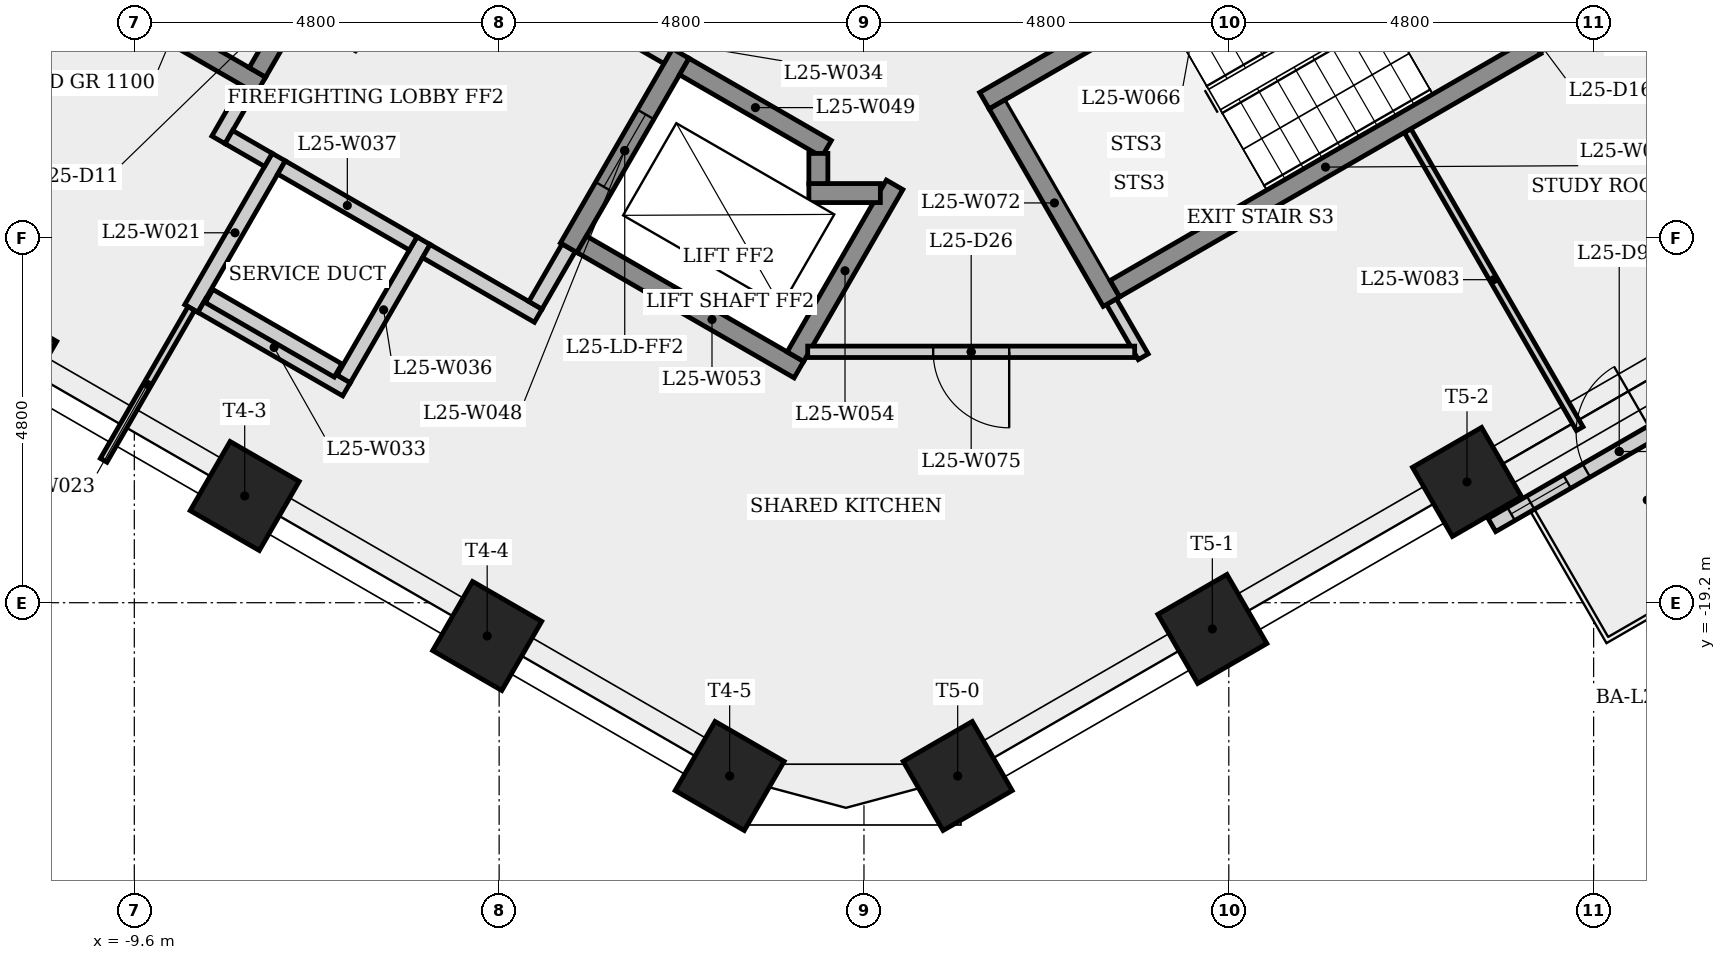
"""IFC4 building model, lengths in metres.
Left out: names, types, materials, properties, quantities, classifications, styles, units other than length and angle.
Written with IfcOpenShell. Run it as: python <this file> out.ifc"""

import sys

from ifc_helpers import new_model, si_unit, direction, frame, frame_2d, origin, origin_2d, place, context, subcontext, project, spatial, rectangle, extrude, element, fill, save


model = new_model("IFC4")
c1 = context("Model", 3, precision=1e-05, world=origin(), true_north=direction((0.0, 1.0)))
c2 = subcontext(c1, "Body", "Model", "MODEL_VIEW")
j1 = project(units=[si_unit("LENGTHUNIT", "METRE"), si_unit("PLANEANGLEUNIT", "RADIAN")], contexts=[c1])
p1 = place(None, origin())
s1 = spatial("IfcSite", under=j1, at=p1, CompositionType="ELEMENT")
p2 = place(p1, origin())
s2 = spatial("IfcBuilding", under=s1, at=p2, CompositionType="ELEMENT")
p3 = place(p2, frame((0.0, 0.0, 96.7)))
s3 = spatial("IfcBuildingStorey", under=s2, at=p3, CompositionType="ELEMENT", Elevation=96.7)
for number, where, z_axis, x_axis in (
    (1, (-11.338, -15.954, 0.0), (0.0, 0.0, 1.0), (-0.5, -0.866, 0.0)),
    (2, (-8.148, -17.796, 0.0), (0.0, 0.0, 1.0), (-0.5, -0.866, 0.0)),
    (3, (-4.957, -19.638, 0.0), (0.0, 0.0, 1.0), (-0.5, -0.866, 0.0)),
    (4, (-1.767, -21.48, 0.0), (0.0, 0.0, 1.0), (-0.5, -0.866, 0.0)),
    (5, (1.233, -21.48, 0.0), (0.0, 0.0, 1.0), (0.5, -0.866, 0.0)),
    (6, (4.583, -19.545, 0.0), (0.0, 0.0, 1.0), (0.5, -0.866, 0.0)),
    (7, (7.934, -17.611, 0.0), (0.0, 0.0, 1.0), (0.5, -0.866, 0.0)),
):
    element("IfcColumn", number, at=place(p3, frame(where, z_axis=z_axis, x_axis=x_axis)), inside=s3, PredefinedType="COLUMN", context=c2, shape_type="SweptSolid", body=[
        extrude(rectangle(XDim=1.05, YDim=1.05, at=origin_2d()), origin(), (0.0, 0.0, 1.0), 3.4),
    ])
p4 = place(p3, frame((8.261, -18.178, 0.0), z_axis=(0.0, 0.0, 1.0), x_axis=(0.866040571269, 0.499973728225, 0.0)))
e8 = element("IfcWall", 8, at=p4, inside=s3, PredefinedType="SOLIDWALL", context=c2, shape_type="SweptSolid", body=[
    extrude(rectangle(XDim=3.869, YDim=0.2, at=frame_2d((1.935, 0.0))), origin(), (0.0, 0.0, 1.0), 3.4),
])
p5 = place(p4, frame((1.435, 0.0, 0.0)))
e9 = element("IfcOpeningElement", 9, at=p5, cuts=e8, PredefinedType="OPENING", context=c2, shape_type="SweptSolid", body=[
    extrude(rectangle(XDim=1.0, YDim=2.4, at=frame_2d((0.5, 1.2))), frame((0.0, 0.11, 0.0), z_axis=(0.0, -1.0, 0.0), x_axis=(1.0, 0.0, 0.0)), (0.0, 0.0, 1.0), 0.22),
])
p6 = place(p4, frame((0.292, 0.0, 0.9)))
e10 = element("IfcOpeningElement", 10, at=p6, cuts=e8, PredefinedType="OPENING", context=c2, shape_type="SweptSolid", body=[
    extrude(rectangle(XDim=0.85, YDim=1.5, at=frame_2d((0.425, 0.75))), frame((0.0, 0.11, 0.0), z_axis=(0.0, -1.0, 0.0), x_axis=(1.0, 0.0, 0.0)), (0.0, 0.0, 1.0), 0.22),
])
p7 = place(p4, frame((2.727, 0.0, 0.9)))
e11 = element("IfcOpeningElement", 11, at=p7, cuts=e8, PredefinedType="OPENING", context=c2, shape_type="SweptSolid", body=[
    extrude(rectangle(XDim=0.85, YDim=1.5, at=frame_2d((0.425, 0.75))), frame((0.0, 0.11, 0.0), z_axis=(0.0, -1.0, 0.0), x_axis=(1.0, 0.0, 0.0)), (0.0, 0.0, 1.0), 0.22),
])
p8 = place(p3, frame((-8.85, -15.329, 0.0), z_axis=(0.0, 0.0, 1.0), x_axis=(0.500077740698, 0.865980515519, 0.0)))
e12 = element("IfcWall", 12, at=p8, inside=s3, PredefinedType="PLUMBINGWALL", context=c2, shape_type="SweptSolid", body=[
    extrude(rectangle(XDim=2.3, YDim=0.2, at=frame_2d((1.15, 0.0))), origin(), (0.0, 0.0, 1.0), 3.05),
])
p9 = place(p3, frame((-8.85, -15.329, 0.0), z_axis=(0.0, 0.0, 1.0), x_axis=(-0.500009533716, -0.866019899421, 0.0)))
e13 = element("IfcWall", 13, at=p9, inside=s3, PredefinedType="PARTITIONING", context=c2, shape_type="SweptSolid", body=[
    extrude(rectangle(XDim=2.307, YDim=0.1, at=frame_2d((1.153, 0.0))), origin(), (0.0, 0.0, 1.0), 3.05),
])
p10 = place(p3, frame((-8.493, -13.11, 0.0), z_axis=(0.0, 0.0, 1.0), x_axis=(0.500067724834, 0.865986299303, 0.0)))
e14 = element("IfcWall", 14, at=p10, inside=s3, PredefinedType="PARTITIONING", context=c2, shape_type="SweptSolid", body=[
    extrude(rectangle(XDim=0.775, YDim=0.2, at=frame_2d((0.388, 0.0))), origin(), (0.0, 0.0, 1.0), 3.05),
])
p11 = place(p3, frame((-7.935, -12.393, 0.0), z_axis=(0.0, 0.0, 1.0), x_axis=(-0.866025499775, 0.499999833739, 0.0)))
e15 = element("IfcWall", 15, at=p11, inside=s3, PredefinedType="SHEAR", context=c2, shape_type="SweptSolid", body=[
    extrude(rectangle(XDim=6.4, YDim=0.25, at=frame_2d((3.2, 0.0))), origin(), (0.0, 0.0, 1.0), 3.05),
])
p12 = place(p3, frame((-7.836, -13.373, 0.0), z_axis=(0.0, 0.0, 1.0), x_axis=(-0.866232998003, 0.499640263761, 0.0)))
e16 = element("IfcWall", 16, at=p12, inside=s3, PredefinedType="PARTITIONING", context=c2, shape_type="SweptSolid", body=[
    extrude(rectangle(XDim=0.6, YDim=0.2, at=frame_2d((0.3, 0.0))), origin(), (0.0, 0.0, 1.0), 3.05),
])
p13 = place(p3, frame((-6.808, -16.392, 0.0), z_axis=(0.0, 0.0, 1.0), x_axis=(-0.866008176907, 0.50002983664, 0.0)))
e17 = element("IfcWall", 17, at=p13, inside=s3, PredefinedType="PLUMBINGWALL", context=c2, shape_type="SweptSolid", body=[
    extrude(rectangle(XDim=2.2, YDim=0.2, at=frame_2d((1.1, 0.0))), origin(), (0.0, 0.0, 1.0), 3.05),
])
p14 = place(p3, frame((-6.605, -9.841, 0.0), z_axis=(0.0, 0.0, 1.0), x_axis=(-0.499996545922, -0.866027397988, 0.0)))
e18 = element("IfcWall", 18, at=p14, inside=s3, PredefinedType="SHEAR", context=c2, shape_type="SweptSolid", body=[
    extrude(rectangle(XDim=2.75, YDim=0.25, at=frame_2d((1.375, 0.0))), origin(), (0.0, 0.0, 1.0), 3.05),
])
p15 = place(p14, frame((0.875, 0.0, 0.0)))
e19 = element("IfcOpeningElement", 19, at=p15, cuts=e18, PredefinedType="OPENING", context=c2, shape_type="SweptSolid", body=[
    extrude(rectangle(XDim=1.0, YDim=2.1, at=frame_2d((0.5, 1.05))), frame((0.0, 0.135, 0.0), z_axis=(0.0, -1.0, 0.0), x_axis=(1.0, 0.0, 0.0)), (0.0, 0.0, 1.0), 0.27),
])
p16 = place(p3, frame((-6.435, -9.795, 0.0), z_axis=(0.0, 0.0, 1.0), x_axis=(0.866012907634, -0.500021643343, 0.0)))
e20 = element("IfcWall", 20, at=p16, inside=s3, PredefinedType="PARTITIONING", context=c2, shape_type="SweptSolid", body=[
    extrude(rectangle(XDim=4.45, YDim=0.2, at=frame_2d((2.225, 0.0))), origin(), (0.0, 0.0, 1.0), 3.05),
])
p17 = place(p16, frame((1.675, 0.0, 0.0)))
e21 = element("IfcOpeningElement", 21, at=p17, cuts=e20, PredefinedType="OPENING", context=c2, shape_type="SweptSolid", body=[
    extrude(rectangle(XDim=1.1, YDim=2.1, at=frame_2d((0.55, 1.05))), frame((0.0, 0.11, 0.0), z_axis=(0.0, -1.0, 0.0), x_axis=(1.0, 0.0, 0.0)), (0.0, 0.0, 1.0), 0.22),
])
p18 = place(p3, frame((-5.795, -14.437, 0.0), z_axis=(0.0, 0.0, 1.0), x_axis=(-0.500027713859, -0.866009402589, 0.0)))
e22 = element("IfcWall", 22, at=p18, inside=s3, PredefinedType="PLUMBINGWALL", context=c2, shape_type="SweptSolid", body=[
    extrude(rectangle(XDim=2.1, YDim=0.2, at=frame_2d((1.05, 0.0))), origin(), (0.0, 0.0, 1.0), 3.05),
])
p19 = place(p3, frame((-5.931, -14.473, 0.0), z_axis=(0.0, 0.0, 1.0), x_axis=(-0.866041268327, 0.499972520799, 0.0)))
e23 = element("IfcWall", 23, at=p19, inside=s3, PredefinedType="PLUMBINGWALL", context=c2, shape_type="SweptSolid", body=[
    extrude(rectangle(XDim=2.0, YDim=0.2, at=frame_2d((1.0, 0.0))), origin(), (0.0, 0.0, 1.0), 3.05),
])
p20 = place(p3, frame((-4.286, -15.423, 0.0), z_axis=(0.0, 0.0, 1.0), x_axis=(-0.866025371046, 0.500000056704, 0.0)))
e24 = element("IfcWall", 24, at=p20, inside=s3, PredefinedType="PARTITIONING", context=c2, shape_type="SweptSolid", body=[
    extrude(rectangle(XDim=1.7, YDim=0.2, at=frame_2d((0.85, 0.0))), origin(), (0.0, 0.0, 1.0), 3.05),
])
p21 = place(p3, frame((-3.885, -14.529, 0.0), z_axis=(0.0, 0.0, 1.0), x_axis=(-0.499859285417, -0.866106630146, 0.0)))
e25 = element("IfcWall", 25, at=p21, inside=s3, PredefinedType="PARTITIONING", context=c2, shape_type="SweptSolid", body=[
    extrude(rectangle(XDim=0.875, YDim=0.2, at=frame_2d((0.438, 0.0))), origin(), (0.0, 0.0, 1.0), 3.05),
])
p22 = place(p3, frame((-2.41, -11.974, 0.0), z_axis=(0.0, 0.0, 1.0), x_axis=(-0.500001826776, -0.866024349092, 0.0)))
e26 = element("IfcWall", 26, at=p22, inside=s3, PredefinedType="SHEAR", context=c2, shape_type="SweptSolid", body=[
    extrude(rectangle(XDim=2.95, YDim=0.25, at=frame_2d((1.475, 0.0))), origin(), (0.0, 0.0, 1.0), 3.05),
])
p23 = place(p22, frame((0.925, 0.0, 0.0)))
e27 = element("IfcOpeningElement", 27, at=p23, cuts=e26, PredefinedType="OPENING", context=c2, shape_type="SweptSolid", body=[
    extrude(rectangle(XDim=1.1, YDim=2.1, at=frame_2d((0.55, 1.05))), frame((0.0, 0.135, 0.0), z_axis=(0.0, -1.0, 0.0), x_axis=(1.0, 0.0, 0.0)), (0.0, 0.0, 1.0), 0.27),
])
p24 = place(p3, frame((-2.364, -12.145, 0.0), z_axis=(0.0, 0.0, 1.0), x_axis=(0.86603892542, -0.499976579108, 0.0)))
e28 = element("IfcWall", 28, at=p24, inside=s3, PredefinedType="SHEAR", context=c2, shape_type="SweptSolid", body=[
    extrude(rectangle(XDim=2.162, YDim=0.25, at=frame_2d((1.081, 0.0))), origin(), (0.0, 0.0, 1.0), 3.05),
])
p25 = place(p3, frame((-0.856, -16.133, 0.0), z_axis=(0.0, 0.0, 1.0), x_axis=(-0.866021716278, 0.500006386895, 0.0)))
e29 = element("IfcWall", 29, at=p25, inside=s3, PredefinedType="SHEAR", context=c2, shape_type="SweptSolid", body=[
    extrude(rectangle(XDim=3.3, YDim=0.25, at=frame_2d((1.65, 0.0))), origin(), (0.0, 0.0, 1.0), 3.05),
])
p26 = place(p3, frame((-0.902, -15.962, 0.0), z_axis=(0.0, 0.0, 1.0), x_axis=(0.499981517636, 0.866036074319, 0.0)))
e30 = element("IfcWall", 30, at=p26, inside=s3, PredefinedType="SHEAR", context=c2, shape_type="SweptSolid", body=[
    extrude(rectangle(XDim=2.61, YDim=0.25, at=frame_2d((1.305, 0.0))), origin(), (0.0, 0.0, 1.0), 3.05),
])
p27 = place(p3, frame((-0.725, -13.81, 0.0), z_axis=(0.0, 0.0, 1.0), x_axis=(1.0, 0.0, 0.0)))
e31 = element("IfcWall", 31, at=p27, inside=s3, PredefinedType="SHEAR", context=c2, shape_type="SweptSolid", body=[
    extrude(rectangle(XDim=0.941, YDim=0.25, at=frame_2d((0.47, 0.0))), origin(), (0.0, 0.0, 1.0), 3.4),
])
p28 = place(p3, frame((-0.6, -13.289, 0.0), z_axis=(0.0, 0.0, 1.0), x_axis=(0.0, -1.0, 0.0)))
e32 = element("IfcWall", 32, at=p28, inside=s3, PredefinedType="SHEAR", context=c2, shape_type="SweptSolid", body=[
    extrude(rectangle(XDim=0.396, YDim=0.25, at=frame_2d((0.198, 0.0))), origin(), (0.0, 0.0, 1.0), 3.4),
])
p29 = place(p3, frame((1.585, -12.595, 0.0), z_axis=(0.0, 0.0, 1.0), x_axis=(0.866036417653, 0.499980922934, 0.0)))
e33 = element("IfcWall", 33, at=p29, inside=s3, PredefinedType="SHEAR", context=c2, shape_type="SweptSolid", body=[
    extrude(rectangle(XDim=6.65, YDim=0.25, at=frame_2d((3.325, 0.0))), origin(), (0.0, 0.0, 1.0), 3.05),
])
p30 = place(p29, frame((5.275, 0.0, 0.0)))
e34 = element("IfcOpeningElement", 34, at=p30, cuts=e33, PredefinedType="OPENING", context=c2, shape_type="SweptSolid", body=[
    extrude(rectangle(XDim=1.0, YDim=2.1, at=frame_2d((0.5, 1.05))), frame((0.0, 0.135, 0.0), z_axis=(0.0, -1.0, 0.0), x_axis=(1.0, 0.0, 0.0)), (0.0, 0.0, 1.0), 0.27),
])
p31 = place(p3, frame((3.256, -15.239, 0.0), z_axis=(0.0, 0.0, 1.0), x_axis=(0.499840262897, -0.866117608404, 0.0)))
e35 = element("IfcWall", 35, at=p31, inside=s3, PredefinedType="PARTITIONING", context=c2, shape_type="SweptSolid", body=[
    extrude(rectangle(XDim=0.837, YDim=0.15, at=frame_2d((0.418, 0.0))), origin(), (0.0, 0.0, 1.0), 3.05),
])
p32 = place(p3, frame((3.256, -15.239, 0.0), z_axis=(0.0, 0.0, 1.0), x_axis=(-0.50002537861, 0.866010750942, 0.0)))
e36 = element("IfcWall", 36, at=p32, inside=s3, PredefinedType="SHEAR", context=c2, shape_type="SweptSolid", body=[
    extrude(rectangle(XDim=3.0, YDim=0.25, at=frame_2d((1.5, 0.0))), origin(), (0.0, 0.0, 1.0), 3.05),
])
p33 = place(p3, frame((3.562, -15.899, 0.0), z_axis=(0.0, 0.0, 1.0), x_axis=(-1.0, 0.0, 0.0)))
e37 = element("IfcWall", 37, at=p33, inside=s3, PredefinedType="PARTITIONING", context=c2, shape_type="SweptSolid", body=[
    extrude(rectangle(XDim=4.302, YDim=0.15, at=frame_2d((2.151, 0.0))), origin(), (0.0, 0.0, 1.0), 3.05),
])
p34 = place(p33, frame((1.651, 0.0, 0.0)))
e38 = element("IfcOpeningElement", 38, at=p34, cuts=e37, PredefinedType="OPENING", context=c2, shape_type="SweptSolid", body=[
    extrude(rectangle(XDim=1.0, YDim=2.1, at=frame_2d((0.5, 1.05))), frame((0.0, 0.085, 0.0), z_axis=(0.0, -1.0, 0.0), x_axis=(1.0, 0.0, 0.0)), (0.0, 0.0, 1.0), 0.17),
])
p35 = place(p3, frame((7.153, -12.989, 0.0), z_axis=(0.0, 0.0, 1.0), x_axis=(0.500000914898, -0.866024875567, 0.0)))
e39 = element("IfcWall", 39, at=p35, inside=s3, PredefinedType="PARTITIONING", context=c2, shape_type="SweptSolid", body=[
    extrude(rectangle(XDim=4.528, YDim=0.1, at=frame_2d((2.264, 0.0))), origin(), (0.0, 0.0, 1.0), 3.05),
])
p36 = place(p3, frame((3.301, -15.068, 0.0), z_axis=(0.0, 0.0, 1.0), x_axis=(0.866035036182, 0.499983315828, 0.0)))
e40 = element("IfcWall", 40, at=p36, inside=s3, PredefinedType="SHEAR", context=c2, shape_type="SweptSolid", body=[
    extrude(rectangle(XDim=6.4, YDim=0.25, at=frame_2d((3.2, 0.0))), origin(), (0.0, 0.0, 1.0), 3.05),
])
p37 = place(p3, frame((10.901, -10.681, 0.0), z_axis=(0.0, 0.0, 1.0), x_axis=(-0.866007538022, -0.500030943131, 0.0)))
e41 = element("IfcWall", 41, at=p37, inside=s3, PredefinedType="PARTITIONING", context=c2, shape_type="SweptSolid", body=[
    extrude(rectangle(XDim=2.375, YDim=0.2, at=frame_2d((1.188, 0.0))), origin(), (0.0, 0.0, 1.0), 3.05),
])
p38 = place(p3, frame((-6.919, -16.144, 0.0), z_axis=(0.0, 0.0, 1.0), x_axis=(-0.866042469362, 0.499970440388, 0.0)))
e42 = element("IfcWall", 42, at=p38, inside=s3, PredefinedType="PLUMBINGWALL", context=c2, shape_type="SweptSolid", body=[
    extrude(rectangle(XDim=1.96, YDim=0.2, at=frame_2d((0.98, 0.0))), origin(), (0.0, 0.0, 1.0), 3.05),
])
p39 = place(p5, origin())
e43 = element("IfcDoor", 43, at=p39, inside=s3, OperationType="SINGLE_SWING_RIGHT", PredefinedType="DOOR", context=c2, shape_type="SweptSolid", body=[
    extrude(rectangle(XDim=1.0, YDim=2.4, at=frame_2d((0.5, 1.2))), frame((0.0, 0.025, 0.0), z_axis=(0.0, -1.0, 0.0), x_axis=(1.0, 0.0, 0.0)), (0.0, 0.0, 1.0), 0.05),
])
fill(e9, e43)
p40 = place(p6, origin())
e44 = element("IfcWindow", 44, at=p40, inside=s3, PartitioningType="SINGLE_PANEL", PredefinedType="WINDOW", context=c2, shape_type="SweptSolid", body=[
    extrude(rectangle(XDim=0.85, YDim=1.5, at=frame_2d((0.425, 0.75))), frame((0.0, 0.03, 0.0), z_axis=(0.0, -1.0, 0.0), x_axis=(1.0, 0.0, 0.0)), (0.0, 0.0, 1.0), 0.06),
])
fill(e10, e44)
p41 = place(p23, origin())
e45 = element("IfcDoor", 45, at=p41, inside=s3, OperationType="SLIDING_TO_LEFT", PredefinedType="DOOR", context=c2, shape_type="SweptSolid", body=[
    extrude(rectangle(XDim=1.1, YDim=2.1, at=frame_2d((0.55, 1.05))), frame((0.0, 0.025, 0.0), z_axis=(0.0, -1.0, 0.0), x_axis=(1.0, 0.0, 0.0)), (0.0, 0.0, 1.0), 0.05),
])
fill(e27, e45)
p42 = place(p34, origin())
e46 = element("IfcDoor", 46, at=p42, inside=s3, OperationType="SINGLE_SWING_LEFT", PredefinedType="DOOR", context=c2, shape_type="SweptSolid", body=[
    extrude(rectangle(XDim=1.0, YDim=2.1, at=frame_2d((0.5, 1.05))), frame((0.0, 0.025, 0.0), z_axis=(0.0, -1.0, 0.0), x_axis=(1.0, 0.0, 0.0)), (0.0, 0.0, 1.0), 0.05),
])
fill(e38, e46)
save(model, sys.argv[1])
